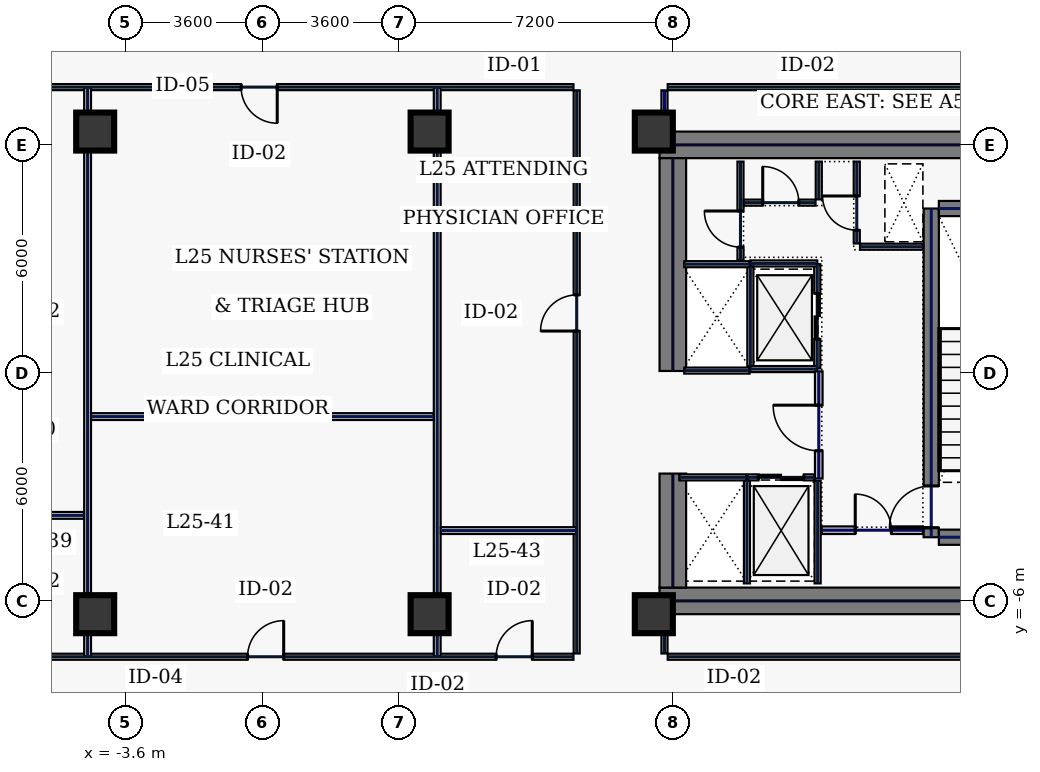
"""IFC4 building model, lengths in metres.
Left out: names, types, materials, properties, quantities, classifications, styles, units other than length and angle.
Written with IfcOpenShell. Run it as: python <this file> out.ifc"""

import sys

from ifc_helpers import new_model, si_unit, direction, frame, frame_2d, origin, origin_2d, place, context, subcontext, project, spatial, rectangle, hollow_rectangle, extrude, element, fill, save


model = new_model("IFC4")
c1 = context("Model", 3, precision=1e-05, world=origin(), true_north=direction((0.0, 1.0)))
c2 = subcontext(c1, "Body", "Model", "MODEL_VIEW")
j1 = project(units=[si_unit("LENGTHUNIT", "METRE"), si_unit("PLANEANGLEUNIT", "RADIAN")], contexts=[c1])
p1 = place(None, origin())
s1 = spatial("IfcSite", under=j1, at=p1, CompositionType="ELEMENT")
p2 = place(p1, origin())
s2 = spatial("IfcBuilding", under=s1, at=p2, CompositionType="ELEMENT")
p3 = place(p2, frame((0.0, 0.0, 113.4)))
s3 = spatial("IfcBuildingStorey", under=s2, at=p3, CompositionType="ELEMENT", Elevation=113.4)
for number, where, z_axis, x_axis in (
    (1, (10.45, 6.0, 0.0), (0.0, 0.0, 1.0), (1.0, 0.0, 0.0)),
    (2, (10.45, -6.0, 0.0), (0.0, 0.0, 1.0), (1.0, 0.0, 0.0)),
):
    element("IfcWall", number, at=place(p3, frame(where, z_axis=z_axis, x_axis=x_axis)), inside=s3, PredefinedType="SHEAR", context=c2, shape_type="SweptSolid", body=[
        extrude(rectangle(XDim=11.55, YDim=0.7, at=frame_2d((5.775, 0.0))), origin(), (0.0, 0.0, 1.0), 3.74),
    ])
p4 = place(p3, frame((10.8, -5.65, 0.0), z_axis=(0.0, 0.0, 1.0), x_axis=(0.0, 1.0, 0.0)))
e3 = element("IfcWall", 3, at=p4, inside=s3, PredefinedType="SHEAR", context=c2, shape_type="SweptSolid", body=[
    extrude(rectangle(XDim=3.0, YDim=0.7, at=frame_2d((1.5, 0.0))), origin(), (0.0, 0.0, 1.0), 3.74),
])
p5 = place(p3, frame((10.8, 0.05, 0.0), z_axis=(0.0, 0.0, 1.0), x_axis=(0.0, 1.0, 0.0)))
e4 = element("IfcWall", 4, at=p5, inside=s3, PredefinedType="SHEAR", context=c2, shape_type="SweptSolid", body=[
    extrude(rectangle(XDim=5.6, YDim=0.7, at=frame_2d((2.8, 0.0))), origin(), (0.0, 0.0, 1.0), 3.74),
])
p6 = place(p3, frame((17.6, -4.325, 0.0), z_axis=(0.0, 0.0, 1.0), x_axis=(0.0, 1.0, 0.0)))
e5 = element("IfcWall", 5, at=p6, inside=s3, PredefinedType="SHEAR", context=c2, shape_type="SweptSolid", body=[
    extrude(rectangle(XDim=8.65, YDim=0.4, at=frame_2d((4.325, 0.0))), origin(), (0.0, 0.0, 1.0), 3.74),
])
p7 = place(p6, frame((0.25, 0.0, 0.0)))
e6 = element("IfcOpeningElement", 6, at=p7, cuts=e5, PredefinedType="OPENING", context=c2, shape_type="SweptSolid", body=[
    extrude(rectangle(XDim=1.1, YDim=2.2, at=frame_2d((0.55, 1.1))), frame((0.0, 0.21, 0.0), z_axis=(0.0, -1.0, 0.0), x_axis=(1.0, 0.0, 0.0)), (0.0, 0.0, 1.0), 0.42),
])
for number, where, z_axis, x_axis in (
    (7, (17.8, -4.325, 0.0), (0.0, 0.0, 1.0), (1.0, 0.0, 0.0)),
    (8, (17.8, 4.325, 0.0), (0.0, 0.0, 1.0), (1.0, 0.0, 0.0)),
):
    element("IfcWall", number, at=place(p3, frame(where, z_axis=z_axis, x_axis=x_axis)), inside=s3, PredefinedType="SHEAR", context=c2, shape_type="SweptSolid", body=[
        extrude(rectangle(XDim=3.4, YDim=0.4, at=frame_2d((1.7, 0.0))), origin(), (0.0, 0.0, 1.0), 3.74),
    ])
for number, where, z_axis, x_axis in (
    (9, (10.3, -6.35, 0.0), (0.0, 0.0, 1.0), (1.0, 0.0, 0.0)),
    (10, (10.3, 6.35, 0.0), (0.0, 0.0, 1.0), (1.0, 0.0, 0.0)),
    (11, (-4.4, -6.35, 0.0), (0.0, 0.0, 1.0), (1.0, 0.0, 0.0)),
    (12, (4.4, -6.35, 0.0), (0.0, 0.0, 1.0), (1.0, 0.0, 0.0)),
    (13, (-4.4, 6.35, 0.0), (0.0, 0.0, 1.0), (1.0, 0.0, 0.0)),
    (14, (4.4, 6.35, 0.0), (0.0, 0.0, 1.0), (1.0, 0.0, 0.0)),
):
    element("IfcColumn", number, at=place(p3, frame(where, z_axis=z_axis, x_axis=x_axis)), inside=s3, PredefinedType="COLUMN", context=c2, shape_type="SweptSolid", body=[
        extrude(hollow_rectangle(XDim=1.0, YDim=1.0, WallThickness=0.045, at=origin_2d()), origin(), (0.0, 0.0, 1.0), 3.74),
    ])
p8 = place(p3, frame((14.6, 0.12, 0.0), z_axis=(0.0, 0.0, 1.0), x_axis=(0.0, 1.0, 0.0)))
e15 = element("IfcWall", 15, at=p8, inside=s3, PredefinedType="PARTITIONING", context=c2, shape_type="SweptSolid", body=[
    extrude(rectangle(XDim=2.74, YDim=0.16, at=frame_2d((1.37, 0.0))), origin(), (0.0, 0.0, 1.0), 3.74),
])
p9 = place(p8, frame((0.77, 0.0, 0.0)))
e16 = element("IfcOpeningElement", 16, at=p9, cuts=e15, PredefinedType="OPENING", context=c2, shape_type="SweptSolid", body=[
    extrude(rectangle(XDim=1.2, YDim=2.2, at=frame_2d((0.6, 1.1))), frame((0.0, 0.09, 0.0), z_axis=(0.0, -1.0, 0.0), x_axis=(1.0, 0.0, 0.0)), (0.0, 0.0, 1.0), 0.18),
])
for number, where, z_axis, x_axis in (
    (17, (12.84, 0.1, 0.0), (0.0, 0.0, 1.0), (1.0, 0.0, 0.0)),
    (18, (12.84, 2.88, 0.0), (0.0, 0.0, 1.0), (1.0, 0.0, 0.0)),
):
    element("IfcWall", number, at=place(p3, frame(where, z_axis=z_axis, x_axis=x_axis)), inside=s3, PredefinedType="PARTITIONING", context=c2, shape_type="SweptSolid", body=[
        extrude(rectangle(XDim=1.76, YDim=0.16, at=frame_2d((0.88, 0.0))), origin(), (0.0, 0.0, 1.0), 3.74),
    ])
p10 = place(p3, frame((12.84, 0.18, 0.0), z_axis=(0.0, 0.0, 1.0), x_axis=(0.0, 1.0, 0.0)))
e19 = element("IfcWall", 19, at=p10, inside=s3, PredefinedType="PARTITIONING", context=c2, shape_type="SweptSolid", body=[
    extrude(rectangle(XDim=2.62, YDim=0.16, at=frame_2d((1.31, 0.0))), origin(), (0.0, 0.0, 1.0), 3.74),
])
p11 = place(p3, frame((12.77, -2.75, 0.0), z_axis=(0.0, 0.0, 1.0), x_axis=(1.0, 0.0, 0.0)))
e20 = element("IfcWall", 20, at=p11, inside=s3, PredefinedType="PARTITIONING", context=c2, shape_type="SweptSolid", body=[
    extrude(rectangle(XDim=1.76, YDim=0.16, at=frame_2d((0.88, 0.0))), origin(), (0.0, 0.0, 1.0), 3.74),
])
p12 = place(p11, frame((0.28, 0.0, 0.0)))
e21 = element("IfcOpeningElement", 21, at=p12, cuts=e20, PredefinedType="OPENING", context=c2, shape_type="SweptSolid", body=[
    extrude(rectangle(XDim=1.2, YDim=2.2, at=frame_2d((0.6, 1.1))), frame((0.0, 0.09, 0.0), z_axis=(0.0, -1.0, 0.0), x_axis=(1.0, 0.0, 0.0)), (0.0, 0.0, 1.0), 0.18),
])
for number, where, z_axis, x_axis in (
    (22, (12.75, -5.54, 0.0), (0.0, 0.0, 1.0), (0.0, 1.0, 0.0)),
    (23, (14.61, -5.54, 0.0), (0.0, 0.0, 1.0), (0.0, 1.0, 0.0)),
):
    element("IfcWall", number, at=place(p3, frame(where, z_axis=z_axis, x_axis=x_axis)), inside=s3, PredefinedType="PARTITIONING", context=c2, shape_type="SweptSolid", body=[
        extrude(rectangle(XDim=2.7, YDim=0.16, at=frame_2d((1.35, 0.0))), origin(), (0.0, 0.0, 1.0), 3.74),
    ])
p13 = place(p3, frame((10.97, -2.75, 0.0), z_axis=(0.0, 0.0, 1.0), x_axis=(1.0, 0.0, 0.0)))
e24 = element("IfcWall", 24, at=p13, inside=s3, PredefinedType="PARTITIONING", context=c2, shape_type="SweptSolid", body=[
    extrude(rectangle(XDim=1.76, YDim=0.16, at=frame_2d((0.88, 0.0))), origin(), (0.0, 0.0, 1.0), 3.74),
])
for number, where, z_axis, x_axis in (
    (25, (11.1, 0.06, 0.0), (0.0, 0.0, 1.0), (1.0, 0.0, 0.0)),
    (26, (11.1, 2.86, 0.0), (0.0, 0.0, 1.0), (1.0, 0.0, 0.0)),
):
    element("IfcWall", number, at=place(p3, frame(where, z_axis=z_axis, x_axis=x_axis)), inside=s3, PredefinedType="PARTITIONING", context=c2, shape_type="SweptSolid", body=[
        extrude(rectangle(XDim=1.72, YDim=0.16, at=frame_2d((0.86, 0.0))), origin(), (0.0, 0.0, 1.0), 3.74),
    ])
p14 = place(p3, frame((15.64, 3.405, 0.0), z_axis=(0.0, 0.0, 1.0), x_axis=(0.0, 1.0, 0.0)))
e27 = element("IfcWall", 27, at=p14, inside=s3, PredefinedType="PARTITIONING", context=c2, shape_type="SweptSolid", body=[
    extrude(rectangle(XDim=2.155, YDim=0.16, at=frame_2d((1.078, 0.0))), origin(), (0.0, 0.0, 1.0), 3.74),
])
p15 = place(p14, frame((0.35, 0.0, 0.0)))
e28 = element("IfcOpeningElement", 28, at=p15, cuts=e27, PredefinedType="OPENING", context=c2, shape_type="SweptSolid", body=[
    extrude(rectangle(XDim=0.9, YDim=2.2, at=frame_2d((0.45, 1.1))), frame((0.0, 0.09, 0.0), z_axis=(0.0, -1.0, 0.0), x_axis=(1.0, 0.0, 0.0)), (0.0, 0.0, 1.0), 0.18),
])
p16 = place(p3, frame((15.725, 3.32, 0.0), z_axis=(0.0, 0.0, 1.0), x_axis=(1.0, 0.0, 0.0)))
e29 = element("IfcWall", 29, at=p16, inside=s3, PredefinedType="PARTITIONING", context=c2, shape_type="SweptSolid", body=[
    extrude(rectangle(XDim=1.655, YDim=0.16, at=frame_2d((0.827, 0.0))), origin(), (0.0, 0.0, 1.0), 3.74),
])
p17 = place(p3, frame((14.72, -4.14, 0.0), z_axis=(0.0, 0.0, 1.0), x_axis=(1.0, 0.0, 0.0)))
e30 = element("IfcWall", 30, at=p17, inside=s3, PredefinedType="SOLIDWALL", context=c2, shape_type="SweptSolid", body=[
    extrude(rectangle(XDim=2.66, YDim=0.2, at=frame_2d((1.33, 0.0))), origin(), (0.0, 0.0, 1.0), 3.74),
])
p18 = place(p17, frame((0.88, 0.0, 0.0)))
e31 = element("IfcOpeningElement", 31, at=p18, cuts=e30, PredefinedType="OPENING", context=c2, shape_type="SweptSolid", body=[
    extrude(rectangle(XDim=0.95, YDim=2.2, at=frame_2d((0.475, 1.1))), frame((0.0, 0.11, 0.0), z_axis=(0.0, -1.0, 0.0), x_axis=(1.0, 0.0, 0.0)), (0.0, 0.0, 1.0), 0.22),
])
p19 = place(p3, frame((12.58, 2.96, 0.0), z_axis=(0.0, 0.0, 1.0), x_axis=(0.0, 1.0, 0.0)))
e32 = element("IfcWall", 32, at=p19, inside=s3, PredefinedType="PARTITIONING", context=c2, shape_type="SweptSolid", body=[
    extrude(rectangle(XDim=2.6, YDim=0.16, at=frame_2d((1.3, 0.0))), origin(), (0.0, 0.0, 1.0), 3.74),
])
p20 = place(p19, frame((0.35, 0.0, 0.0)))
e33 = element("IfcOpeningElement", 33, at=p20, cuts=e32, PredefinedType="OPENING", context=c2, shape_type="SweptSolid", body=[
    extrude(rectangle(XDim=0.95, YDim=2.2, at=frame_2d((0.475, 1.1))), frame((0.0, 0.09, 0.0), z_axis=(0.0, -1.0, 0.0), x_axis=(1.0, 0.0, 0.0)), (0.0, 0.0, 1.0), 0.18),
])
p21 = place(p3, frame((12.665, 4.48, 0.0), z_axis=(0.0, 0.0, 1.0), x_axis=(1.0, 0.0, 0.0)))
e34 = element("IfcWall", 34, at=p21, inside=s3, PredefinedType="PARTITIONING", context=c2, shape_type="SweptSolid", body=[
    extrude(rectangle(XDim=1.89, YDim=0.16, at=frame_2d((0.945, 0.0))), origin(), (0.0, 0.0, 1.0), 3.74),
])
p22 = place(p21, frame((0.5, 0.0, 0.0)))
e35 = element("IfcOpeningElement", 35, at=p22, cuts=e34, PredefinedType="OPENING", context=c2, shape_type="SweptSolid", body=[
    extrude(rectangle(XDim=0.95, YDim=2.2, at=frame_2d((0.475, 1.1))), frame((0.0, 0.09, 0.0), z_axis=(0.0, -1.0, 0.0), x_axis=(1.0, 0.0, 0.0)), (0.0, 0.0, 1.0), 0.18),
])
p23 = place(p3, frame((14.64, 4.565, 0.0), z_axis=(0.0, 0.0, 1.0), x_axis=(0.0, 1.0, 0.0)))
e36 = element("IfcWall", 36, at=p23, inside=s3, PredefinedType="PARTITIONING", context=c2, shape_type="SweptSolid", body=[
    extrude(rectangle(XDim=0.995, YDim=0.16, at=frame_2d((0.498, 0.0))), origin(), (0.0, 0.0, 1.0), 3.74),
])
p24 = place(p3, frame((14.64, -2.78, 0.0), z_axis=(0.0, 0.0, 1.0), x_axis=(0.0, 1.0, 0.0)))
e37 = element("IfcWall", 37, at=p24, inside=s3, PredefinedType="SOLIDWALL", context=c2, shape_type="SweptSolid", body=[
    extrude(rectangle(XDim=2.82, YDim=0.2, at=frame_2d((1.41, 0.0))), origin(), (0.0, 0.0, 1.0), 3.74),
])
p25 = place(p24, frame((0.73, 0.0, 0.0)))
e38 = element("IfcOpeningElement", 38, at=p25, cuts=e37, PredefinedType="OPENING", context=c2, shape_type="SweptSolid", body=[
    extrude(rectangle(XDim=1.2, YDim=2.2, at=frame_2d((0.6, 1.1))), frame((0.0, 0.11, 0.0), z_axis=(0.0, -1.0, 0.0), x_axis=(1.0, 0.0, 0.0)), (0.0, 0.0, 1.0), 0.22),
])
p26 = place(p3, frame((25.235, 7.52, 0.0), z_axis=(0.0, 0.0, 1.0), x_axis=(-1.0, 0.0, 0.0)))
e39 = element("IfcWall", 39, at=p26, inside=s3, PredefinedType="PARTITIONING", context=c2, shape_type="SweptSolid", body=[
    extrude(rectangle(XDim=14.57, YDim=0.16, at=frame_2d((7.285, 0.0))), origin(), (0.0, 0.0, 1.0), 3.74),
])
p27 = place(p3, frame((10.58, 7.435, 0.0), z_axis=(0.0, 0.0, 1.0), x_axis=(0.0, -1.0, 0.0)))
e40 = element("IfcWall", 40, at=p27, inside=s3, PredefinedType="PARTITIONING", context=c2, shape_type="SweptSolid", body=[
    extrude(rectangle(XDim=1.015, YDim=0.16, at=frame_2d((0.508, 0.0))), origin(), (0.0, 0.0, 1.0), 1.535),
])
p28 = place(p3, frame((10.58, -6.42, 0.0), z_axis=(0.0, 0.0, 1.0), x_axis=(0.0, -1.0, 0.0)))
e41 = element("IfcWall", 41, at=p28, inside=s3, PredefinedType="PARTITIONING", context=c2, shape_type="SweptSolid", body=[
    extrude(rectangle(XDim=0.965, YDim=0.16, at=frame_2d((0.482, 0.0))), origin(), (0.0, 0.0, 1.0), 3.74),
])
p29 = place(p3, frame((10.665, -7.47, 0.0), z_axis=(0.0, 0.0, 1.0), x_axis=(1.0, 0.0, 0.0)))
e42 = element("IfcWall", 42, at=p29, inside=s3, PredefinedType="PARTITIONING", context=c2, shape_type="SweptSolid", body=[
    extrude(rectangle(XDim=14.57, YDim=0.16, at=frame_2d((7.285, 0.0))), origin(), (0.0, 0.0, 1.0), 3.74),
])
p30 = place(p3, frame((8.185, 7.52, 0.0), z_axis=(0.0, 0.0, 1.0), x_axis=(-1.0, 0.0, 0.0)))
e43 = element("IfcWall", 43, at=p30, inside=s3, PredefinedType="PARTITIONING", context=c2, shape_type="SweptSolid", body=[
    extrude(rectangle(XDim=16.37, YDim=0.16, at=frame_2d((8.185, 0.0))), origin(), (0.0, 0.0, 1.0), 3.74),
])
p31 = place(p30, frame((7.795, 0.0, 0.0)))
e44 = element("IfcOpeningElement", 44, at=p31, cuts=e43, PredefinedType="OPENING", context=c2, shape_type="SweptSolid", body=[
    extrude(rectangle(XDim=0.95, YDim=2.2, at=frame_2d((0.475, 1.1))), frame((0.0, 0.09, 0.0), z_axis=(0.0, -1.0, 0.0), x_axis=(1.0, 0.0, 0.0)), (0.0, 0.0, 1.0), 0.18),
])
p32 = place(p3, frame((-8.185, -7.47, 0.0), z_axis=(0.0, 0.0, 1.0), x_axis=(1.0, 0.0, 0.0)))
e45 = element("IfcWall", 45, at=p32, inside=s3, PredefinedType="PARTITIONING", context=c2, shape_type="SweptSolid", body=[
    extrude(rectangle(XDim=16.37, YDim=0.16, at=frame_2d((8.185, 0.0))), origin(), (0.0, 0.0, 1.0), 3.74),
])
p33 = place(p32, frame((7.795, 0.0, 0.0)))
e46 = element("IfcOpeningElement", 46, at=p33, cuts=e45, PredefinedType="OPENING", context=c2, shape_type="SweptSolid", body=[
    extrude(rectangle(XDim=0.95, YDim=2.2, at=frame_2d((0.475, 1.1))), frame((0.0, 0.09, 0.0), z_axis=(0.0, -1.0, 0.0), x_axis=(1.0, 0.0, 0.0)), (0.0, 0.0, 1.0), 0.18),
])
p34 = place(p32, frame((14.336, 0.0, 0.0)))
e47 = element("IfcOpeningElement", 47, at=p34, cuts=e45, PredefinedType="OPENING", context=c2, shape_type="SweptSolid", body=[
    extrude(rectangle(XDim=0.95, YDim=2.2, at=frame_2d((0.475, 1.1))), frame((0.0, 0.09, 0.0), z_axis=(0.0, -1.0, 0.0), x_axis=(1.0, 0.0, 0.0)), (0.0, 0.0, 1.0), 0.18),
])
p35 = place(p3, frame((8.27, -7.385, 0.0), z_axis=(0.0, 0.0, 1.0), x_axis=(0.0, 1.0, 0.0)))
e48 = element("IfcWall", 48, at=p35, inside=s3, PredefinedType="PARTITIONING", context=c2, shape_type="SweptSolid", body=[
    extrude(rectangle(XDim=14.82, YDim=0.16, at=frame_2d((7.41, 0.0))), origin(), (0.0, 0.0, 1.0), 3.74),
])
p36 = place(p35, frame((8.486, 0.0, 0.0)))
e49 = element("IfcOpeningElement", 49, at=p36, cuts=e48, PredefinedType="OPENING", context=c2, shape_type="SweptSolid", body=[
    extrude(rectangle(XDim=0.95, YDim=2.2, at=frame_2d((0.475, 1.1))), frame((0.0, 0.09, 0.0), z_axis=(0.0, -1.0, 0.0), x_axis=(1.0, 0.0, 0.0)), (0.0, 0.0, 1.0), 0.18),
])
for number, where, z_axis, x_axis in (
    (50, (-4.6, -7.465, 0.0), (0.0, 0.0, 1.0), (0.0, 1.0, 0.0)),
    (51, (4.6, -7.465, 0.0), (0.0, 0.0, 1.0), (0.0, 1.0, 0.0)),
):
    element("IfcWall", number, at=place(p3, frame(where, z_axis=z_axis, x_axis=x_axis)), inside=s3, PredefinedType="PARTITIONING", context=c2, shape_type="SweptSolid", body=[
        extrude(rectangle(XDim=14.98, YDim=0.18, at=frame_2d((7.49, 0.0))), origin(), (0.0, 0.0, 1.0), 2.935),
    ])
p37 = place(p3, frame((-4.505, -1.15, 0.0), z_axis=(0.0, 0.0, 1.0), x_axis=(1.0, 0.0, 0.0)))
e52 = element("IfcWall", 52, at=p37, inside=s3, PredefinedType="PARTITIONING", context=c2, shape_type="SweptSolid", body=[
    extrude(rectangle(XDim=9.01, YDim=0.18, at=frame_2d((4.505, 0.0))), origin(), (0.0, 0.0, 1.0), 3.74),
])
for number, where, z_axis, x_axis in (
    (53, (-8.265, -3.75, 0.0), (0.0, 0.0, 1.0), (1.0, 0.0, 0.0)),
    (54, (4.695, -4.15, 0.0), (0.0, 0.0, 1.0), (1.0, 0.0, 0.0)),
):
    element("IfcWall", number, at=place(p3, frame(where, z_axis=z_axis, x_axis=x_axis)), inside=s3, PredefinedType="PARTITIONING", context=c2, shape_type="SweptSolid", body=[
        extrude(rectangle(XDim=3.57, YDim=0.18, at=frame_2d((1.785, 0.0))), origin(), (0.0, 0.0, 1.0), 3.74),
    ])
p38 = place(p7, origin())
e55 = element("IfcDoor", 55, at=p38, inside=s3, OperationType="SINGLE_SWING_LEFT", PredefinedType="DOOR", context=c2, shape_type="SweptSolid", body=[
    extrude(rectangle(XDim=1.1, YDim=2.2, at=frame_2d((0.55, 1.1))), frame((0.0, 0.025, 0.0), z_axis=(0.0, -1.0, 0.0), x_axis=(1.0, 0.0, 0.0)), (0.0, 0.0, 1.0), 0.05),
])
fill(e6, e55)
p39 = place(p9, origin())
e56 = element("IfcDoor", 56, at=p39, inside=s3, OperationType="SLIDING_TO_LEFT", PredefinedType="DOOR", context=c2, shape_type="SweptSolid", body=[
    extrude(rectangle(XDim=1.2, YDim=2.2, at=frame_2d((0.6, 1.1))), frame((0.0, 0.025, 0.0), z_axis=(0.0, -1.0, 0.0), x_axis=(1.0, 0.0, 0.0)), (0.0, 0.0, 1.0), 0.05),
])
fill(e16, e56)
p40 = place(p12, origin())
e57 = element("IfcDoor", 57, at=p40, inside=s3, OperationType="SLIDING_TO_LEFT", PredefinedType="DOOR", context=c2, shape_type="SweptSolid", body=[
    extrude(rectangle(XDim=1.2, YDim=2.2, at=frame_2d((0.6, 1.1))), frame((0.0, 0.025, 0.0), z_axis=(0.0, -1.0, 0.0), x_axis=(1.0, 0.0, 0.0)), (0.0, 0.0, 1.0), 0.05),
])
fill(e21, e57)
p41 = place(p15, origin())
e58 = element("IfcDoor", 58, at=p41, inside=s3, OperationType="SINGLE_SWING_RIGHT", PredefinedType="DOOR", context=c2, shape_type="SweptSolid", body=[
    extrude(rectangle(XDim=0.9, YDim=2.2, at=frame_2d((0.45, 1.1))), frame((0.0, 0.025, 0.0), z_axis=(0.0, -1.0, 0.0), x_axis=(1.0, 0.0, 0.0)), (0.0, 0.0, 1.0), 0.05),
])
fill(e28, e58)
p42 = place(p18, origin())
e59 = element("IfcDoor", 59, at=p42, inside=s3, OperationType="SINGLE_SWING_LEFT", PredefinedType="DOOR", context=c2, shape_type="SweptSolid", body=[
    extrude(rectangle(XDim=0.95, YDim=2.2, at=frame_2d((0.475, 1.1))), frame((0.0, 0.025, 0.0), z_axis=(0.0, -1.0, 0.0), x_axis=(1.0, 0.0, 0.0)), (0.0, 0.0, 1.0), 0.05),
])
fill(e31, e59)
p43 = place(p20, origin())
e60 = element("IfcDoor", 60, at=p43, inside=s3, OperationType="SINGLE_SWING_RIGHT", PredefinedType="DOOR", context=c2, shape_type="SweptSolid", body=[
    extrude(rectangle(XDim=0.95, YDim=2.2, at=frame_2d((0.475, 1.1))), frame((0.0, 0.025, 0.0), z_axis=(0.0, -1.0, 0.0), x_axis=(1.0, 0.0, 0.0)), (0.0, 0.0, 1.0), 0.05),
])
fill(e33, e60)
p44 = place(p22, origin())
e61 = element("IfcDoor", 61, at=p44, inside=s3, OperationType="SINGLE_SWING_LEFT", PredefinedType="DOOR", context=c2, shape_type="SweptSolid", body=[
    extrude(rectangle(XDim=0.95, YDim=2.2, at=frame_2d((0.475, 1.1))), frame((0.0, 0.025, 0.0), z_axis=(0.0, -1.0, 0.0), x_axis=(1.0, 0.0, 0.0)), (0.0, 0.0, 1.0), 0.05),
])
fill(e35, e61)
p45 = place(p25, origin())
e62 = element("IfcDoor", 62, at=p45, inside=s3, OperationType="SINGLE_SWING_RIGHT", PredefinedType="DOOR", context=c2, shape_type="SweptSolid", body=[
    extrude(rectangle(XDim=1.2, YDim=2.2, at=frame_2d((0.6, 1.1))), frame((0.0, 0.025, 0.0), z_axis=(0.0, -1.0, 0.0), x_axis=(1.0, 0.0, 0.0)), (0.0, 0.0, 1.0), 0.05),
])
fill(e38, e62)
p46 = place(p33, origin())
e63 = element("IfcDoor", 63, at=p46, inside=s3, OperationType="SINGLE_SWING_RIGHT", PredefinedType="DOOR", context=c2, shape_type="SweptSolid", body=[
    extrude(rectangle(XDim=0.95, YDim=2.2, at=frame_2d((0.475, 1.1))), frame((0.0, 0.025, 0.0), z_axis=(0.0, -1.0, 0.0), x_axis=(1.0, 0.0, 0.0)), (0.0, 0.0, 1.0), 0.05),
])
fill(e46, e63)
p47 = place(p31, origin())
e64 = element("IfcDoor", 64, at=p47, inside=s3, OperationType="SINGLE_SWING_LEFT", PredefinedType="DOOR", context=c2, shape_type="SweptSolid", body=[
    extrude(rectangle(XDim=0.95, YDim=2.2, at=frame_2d((0.475, 1.1))), frame((0.0, 0.025, 0.0), z_axis=(0.0, -1.0, 0.0), x_axis=(1.0, 0.0, 0.0)), (0.0, 0.0, 1.0), 0.05),
])
fill(e44, e64)
p48 = place(p34, origin())
e65 = element("IfcDoor", 65, at=p48, inside=s3, OperationType="SINGLE_SWING_RIGHT", PredefinedType="DOOR", context=c2, shape_type="SweptSolid", body=[
    extrude(rectangle(XDim=0.95, YDim=2.2, at=frame_2d((0.475, 1.1))), frame((0.0, 0.025, 0.0), z_axis=(0.0, -1.0, 0.0), x_axis=(1.0, 0.0, 0.0)), (0.0, 0.0, 1.0), 0.05),
])
fill(e47, e65)
p49 = place(p36, origin())
e66 = element("IfcDoor", 66, at=p49, inside=s3, OperationType="SINGLE_SWING_LEFT", PredefinedType="DOOR", context=c2, shape_type="SweptSolid", body=[
    extrude(rectangle(XDim=0.95, YDim=2.2, at=frame_2d((0.475, 1.1))), frame((0.0, 0.025, 0.0), z_axis=(0.0, -1.0, 0.0), x_axis=(1.0, 0.0, 0.0)), (0.0, 0.0, 1.0), 0.05),
])
fill(e49, e66)
save(model, sys.argv[1])
